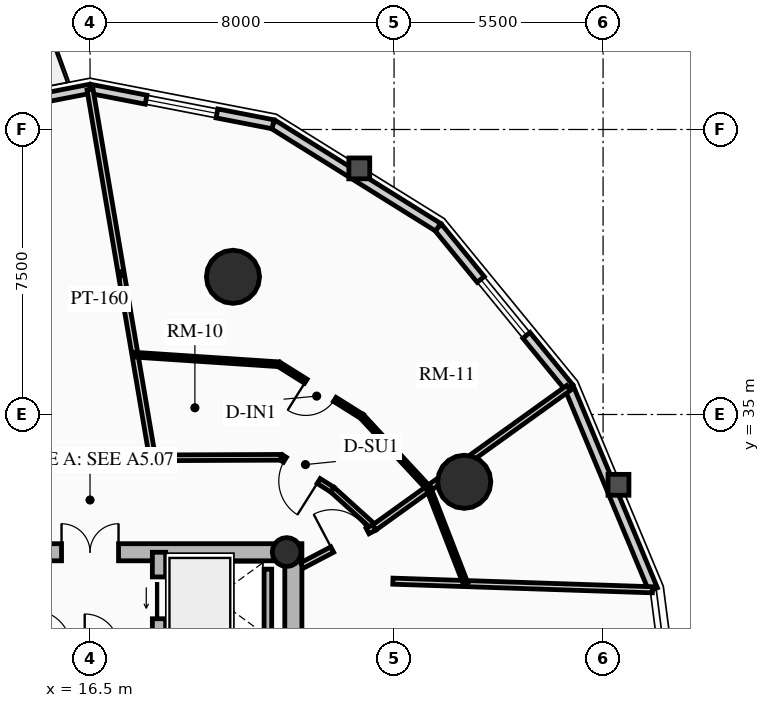
"""IFC4 building model, lengths in metres.
Left out: names, types, materials, properties, quantities, classifications, styles, units other than length and angle.
Written with IfcOpenShell. Run it as: python <this file> out.ifc"""

import sys

from ifc_helpers import new_model, si_unit, direction, frame, frame_2d, origin, origin_2d, place, context, subcontext, project, spatial, rectangle, circle, hollow_circle, extrude, source, transform, mapped, element, fill, save


model = new_model("IFC4")
c1 = context("Model", 3, precision=1e-05, world=origin(), true_north=direction((0.0, 1.0)))
c2 = subcontext(c1, "Body", "Model", "MODEL_VIEW")
j1 = project(units=[si_unit("LENGTHUNIT", "METRE"), si_unit("PLANEANGLEUNIT", "RADIAN")], contexts=[c1])
p1 = place(None, origin())
s1 = spatial("IfcSite", under=j1, at=p1, CompositionType="ELEMENT")
p2 = place(p1, origin())
s2 = spatial("IfcBuilding", under=s1, at=p2, CompositionType="ELEMENT")
p3 = place(p2, frame((0.0, 0.0, 105.07)))
s3 = spatial("IfcBuildingStorey", under=s2, at=p3, CompositionType="ELEMENT", Elevation=105.07)
p4 = place(p3, frame((21.85, 17.4, 0.0), z_axis=(0.0, 0.0, 1.0), x_axis=(0.0, 1.0, 0.0)))
e1 = element("IfcWall", 1, at=p4, inside=s3, PredefinedType="SHEAR", context=c2, shape_type="SweptSolid", body=[
    extrude(rectangle(XDim=14.2, YDim=0.45, at=frame_2d((7.1, 0.0))), origin(), (0.0, 0.0, 1.0), 2.91),
])
p5 = place(p3, frame((11.15, 31.375, 0.0), z_axis=(0.0, 0.0, 1.0), x_axis=(1.0, 0.0, 0.0)))
e2 = element("IfcWall", 2, at=p5, inside=s3, PredefinedType="SHEAR", context=c2, shape_type="SweptSolid", body=[
    extrude(rectangle(XDim=10.7, YDim=0.45, at=frame_2d((5.35, 0.0))), origin(), (0.0, 0.0, 1.0), 2.91),
])
m1 = source(origin(), c2, "Body", "SweptSolid", [
    extrude(rectangle(XDim=1.5, YDim=2.02, at=frame_2d((0.75, 1.01))), frame((0.0, 0.235, 0.0), z_axis=(0.0, -1.0, 0.0), x_axis=(1.0, 0.0, 0.0)), (0.0, 0.0, 1.0), 0.47),
])
p6 = place(p5, frame((4.6, 0.0, 0.0)))
e3 = element("IfcOpeningElement", 3, at=p6, cuts=e2, PredefinedType="OPENING", context=c2, shape_type="MappedRepresentation", body=[
    mapped(m1, transform((0.0, 0.0, 0.0), x_axis=(1.0, 0.0, 0.0), y_axis=(0.0, 1.0, 0.0), z_axis=(0.0, 0.0, 1.0), scale=1.0)),
])
p7 = place(p3, frame((18.315, 17.625, 0.0), z_axis=(0.0, 0.0, 1.0), x_axis=(0.0, 1.0, 0.0)))
e4 = element("IfcWall", 4, at=p7, inside=s3, PredefinedType="SHEAR", context=c2, shape_type="SweptSolid", body=[
    extrude(rectangle(XDim=13.75, YDim=0.35, at=frame_2d((6.875, 0.0))), origin(), (0.0, 0.0, 1.0), 2.91),
])
m2 = source(origin(), c2, "Body", "SweptSolid", [
    extrude(rectangle(XDim=1.1, YDim=2.015, at=frame_2d((0.55, 1.007))), frame((0.0, 0.185, 0.0), z_axis=(0.0, -1.0, 0.0), x_axis=(1.0, 0.0, 0.0)), (0.0, 0.0, 1.0), 0.37),
])
p8 = place(p7, frame((10.0, 0.0, 0.0)))
e5 = element("IfcOpeningElement", 5, at=p8, cuts=e4, PredefinedType="OPENING", context=c2, shape_type="MappedRepresentation", body=[
    mapped(m2, transform((0.0, 0.0, 0.0), x_axis=(1.0, 0.0, 0.0), y_axis=(0.0, 1.0, 0.0), z_axis=(0.0, 0.0, 1.0), scale=1.0)),
])
p9 = place(p7, frame((12.0, 0.0, 0.0)))
e6 = element("IfcOpeningElement", 6, at=p9, cuts=e4, PredefinedType="OPENING", context=c2, shape_type="MappedRepresentation", body=[
    mapped(m2, transform((0.0, 0.0, 0.0), x_axis=(1.0, 0.0, 0.0), y_axis=(0.0, 1.0, 0.0), z_axis=(0.0, 0.0, 1.0), scale=1.0)),
])
m3 = source(origin(), c2, "Body", "SweptSolid", [
    extrude(rectangle(XDim=1.15, YDim=2.02, at=frame_2d((0.575, 1.01))), frame((0.0, 0.185, 0.0), z_axis=(0.0, -1.0, 0.0), x_axis=(1.0, 0.0, 0.0)), (0.0, 0.0, 1.0), 0.37),
])
p10 = place(p7, frame((5.305, 0.0, 0.0)))
e7 = element("IfcOpeningElement", 7, at=p10, cuts=e4, PredefinedType="OPENING", context=c2, shape_type="MappedRepresentation", body=[
    mapped(m3, transform((0.0, 0.0, 0.0), x_axis=(1.0, 0.0, 0.0), y_axis=(0.0, 1.0, 0.0), z_axis=(0.0, 0.0, 1.0), scale=1.0)),
])
p11 = place(p3, frame((21.675, 31.38, 0.0), z_axis=(0.0, 0.0, 1.0), x_axis=(1.0, 0.0, 0.0)))
e8 = element("IfcColumn", 8, at=p11, inside=s3, PredefinedType="COLUMN", context=c2, shape_type="SweptSolid", body=[
    extrude(hollow_circle(Radius=0.38, WallThickness=0.032, at=origin_2d()), origin(), (0.0, 0.0, 1.0), 2.91),
])
for number, where, z_axis, x_axis in (
    (9, (26.347, 33.229, 0.0), (0.0, 0.0, 1.0), (1.0, 0.0, 0.0)),
    (10, (20.261, 38.623, 0.0), (0.0, 0.0, 1.0), (1.0, 0.0, 0.0)),
):
    element("IfcColumn", number, at=place(p3, frame(where, z_axis=z_axis, x_axis=x_axis)), inside=s3, PredefinedType="USERDEFINED", context=c2, shape_type="SweptSolid", body=[
        extrude(circle(Radius=0.7, at=origin_2d()), origin(), (0.0, 0.0, 1.0), 2.91),
    ])
p12 = place(p3, frame((29.105, 35.709, 0.0), z_axis=(0.0, 0.0, 1.0), x_axis=(0.384344417632, -0.923189779317, 0.0)))
e11 = element("IfcWall", 11, at=p12, inside=s3, PredefinedType="SOLIDWALL", context=c2, shape_type="SweptSolid", body=[
    extrude(rectangle(XDim=5.758, YDim=0.24, at=frame_2d((2.879, 0.0))), origin(), (0.0, 0.0, 1.0), 2.179),
])
p13 = place(p3, frame((25.658, 39.928, 0.0), z_axis=(0.0, 0.0, 1.0), x_axis=(0.632700781152, -0.77439635945, 0.0)))
e12 = element("IfcWall", 12, at=p13, inside=s3, PredefinedType="SOLIDWALL", context=c2, shape_type="SweptSolid", body=[
    extrude(rectangle(XDim=5.448, YDim=0.24, at=frame_2d((2.724, 0.0))), origin(), (0.0, 0.0, 1.0), 2.179),
])
m4 = source(origin(), c2, "Body", "SweptSolid", [
    extrude(rectangle(XDim=1.9, YDim=1.35, at=frame_2d((0.95, 0.675))), frame((0.0, 0.13, 0.0), z_axis=(0.0, -1.0, 0.0), x_axis=(1.0, 0.0, 0.0)), (0.0, 0.0, 1.0), 0.26),
])
p14 = place(p13, frame((1.774, 0.0, 0.65)))
e13 = element("IfcOpeningElement", 13, at=p14, cuts=e12, PredefinedType="OPENING", context=c2, shape_type="MappedRepresentation", body=[
    mapped(m4, transform((0.0, 0.0, 0.0), x_axis=(1.0, 0.0, 0.0), y_axis=(0.0, 1.0, 0.0), z_axis=(0.0, 0.0, 1.0), scale=1.0)),
])
p15 = place(p3, frame((21.315, 42.637, 0.0), z_axis=(0.0, 0.0, 1.0), x_axis=(0.848520380187, -0.529162701263, 0.0)))
e14 = element("IfcWall", 14, at=p15, inside=s3, PredefinedType="SOLIDWALL", context=c2, shape_type="SweptSolid", body=[
    extrude(rectangle(XDim=5.119, YDim=0.24, at=frame_2d((2.56, 0.0))), origin(), (0.0, 0.0, 1.0), 2.179),
])
p16 = place(p3, frame((16.5, 43.57, 0.0), z_axis=(0.0, 0.0, 1.0), x_axis=(0.981723785992, -0.190311344954, 0.0)))
e15 = element("IfcWall", 15, at=p16, inside=s3, PredefinedType="SOLIDWALL", context=c2, shape_type="SweptSolid", body=[
    extrude(rectangle(XDim=4.904, YDim=0.24, at=frame_2d((2.452, 0.0))), origin(), (0.0, 0.0, 1.0), 2.179),
])
p17 = place(p16, frame((1.502, 0.0, 0.65)))
e16 = element("IfcOpeningElement", 16, at=p17, cuts=e15, PredefinedType="OPENING", context=c2, shape_type="MappedRepresentation", body=[
    mapped(m4, transform((0.0, 0.0, 0.0), x_axis=(1.0, 0.0, 0.0), y_axis=(0.0, 1.0, 0.0), z_axis=(0.0, 0.0, 1.0), scale=1.0)),
])
p18 = place(p3, frame((11.685, 42.637, 0.0), z_axis=(0.0, 0.0, 1.0), x_axis=(0.981723785992, 0.190311344954, 0.0)))
e17 = element("IfcWall", 17, at=p18, inside=s3, PredefinedType="SOLIDWALL", context=c2, shape_type="SweptSolid", body=[
    extrude(rectangle(XDim=4.904, YDim=0.24, at=frame_2d((2.452, 0.0))), origin(), (0.0, 0.0, 1.0), 2.179),
])
m5 = source(origin(), c2, "Body", "SweptSolid", [
    extrude(rectangle(XDim=1.15, YDim=2.005, at=frame_2d((0.575, 1.002))), frame((0.0, 0.13, 0.0), z_axis=(0.0, -1.0, 0.0), x_axis=(1.0, 0.0, 0.0)), (0.0, 0.0, 1.0), 0.26),
])
p19 = place(p18, frame((1.877, 0.0, 0.0)))
e18 = element("IfcOpeningElement", 18, at=p19, cuts=e17, PredefinedType="OPENING", context=c2, shape_type="MappedRepresentation", body=[
    mapped(m5, transform((0.0, 0.0, 0.0), x_axis=(1.0, 0.0, 0.0), y_axis=(0.0, 1.0, 0.0), z_axis=(0.0, 0.0, 1.0), scale=1.0)),
])
p20 = place(p3, frame((21.18, 29.295, 0.0), z_axis=(0.0, 0.0, 1.0), x_axis=(0.0, 1.0, 0.0)))
e19 = element("IfcWall", 19, at=p20, inside=s3, PredefinedType="SHEAR", context=c2, shape_type="SweptSolid", body=[
    extrude(rectangle(XDim=1.635, YDim=0.2, at=frame_2d((0.817, 0.0))), origin(), (0.0, 0.0, 1.0), 2.91),
])
p21 = place(p3, frame((23.98, 32.027, 0.0), z_axis=(0.0, 0.0, 1.0), x_axis=(-0.742353224332, 0.670008724065, 0.0)))
e20 = element("IfcWall", 20, at=p21, inside=s3, PredefinedType="PARTITIONING", context=c2, shape_type="SweptSolid", body=[
    extrude(rectangle(XDim=1.485, YDim=0.15, at=frame_2d((0.742, 0.0))), origin(), (0.0, 0.0, 1.0), 2.225),
])
p22 = place(p3, frame((22.877, 33.022, 0.0), z_axis=(0.0, 0.0, 1.0), x_axis=(-0.845895608855, 0.533348496689, 0.0)))
e21 = element("IfcWall", 21, at=p22, inside=s3, PredefinedType="PARTITIONING", context=c2, shape_type="SweptSolid", body=[
    extrude(rectangle(XDim=1.597, YDim=0.15, at=frame_2d((0.798, 0.0))), origin(), (0.0, 0.0, 1.0), 2.225),
])
m6 = source(origin(), c2, "Body", "SweptSolid", [
    extrude(rectangle(XDim=1.05, YDim=2.015, at=frame_2d((0.525, 1.007))), frame((0.0, 0.085, 0.0), z_axis=(0.0, -1.0, 0.0), x_axis=(1.0, 0.0, 0.0)), (0.0, 0.0, 1.0), 0.17),
])
p23 = place(p22, frame((0.427, 0.0, 0.0)))
e22 = element("IfcOpeningElement", 22, at=p23, cuts=e21, PredefinedType="OPENING", context=c2, shape_type="MappedRepresentation", body=[
    mapped(m6, transform((0.0, 0.0, 0.0), x_axis=(1.0, 0.0, 0.0), y_axis=(0.0, 1.0, 0.0), z_axis=(0.0, 0.0, 1.0), scale=1.0)),
])
p24 = place(p3, frame((21.527, 33.873, 0.0), z_axis=(0.0, 0.0, 1.0), x_axis=(-0.999991838845, -0.004040079574, 0.0)))
e23 = element("IfcWall", 23, at=p24, inside=s3, PredefinedType="PARTITIONING", context=c2, shape_type="SweptSolid", body=[
    extrude(rectangle(XDim=3.384, YDim=0.15, at=frame_2d((1.692, 0.0))), origin(), (0.0, 0.0, 1.0), 2.225),
])
p25 = place(p3, frame((18.143, 33.86, 0.0), z_axis=(0.0, 0.0, 1.0), x_axis=(-0.999419208319, -0.034077060363, 0.0)))
e24 = element("IfcWall", 24, at=p25, inside=s3, PredefinedType="PARTITIONING", context=c2, shape_type="SweptSolid", body=[
    extrude(rectangle(XDim=6.527, YDim=0.15, at=frame_2d((3.263, 0.0))), origin(), (0.0, 0.0, 1.0), 2.225),
])
p26 = place(p3, frame((24.469, 30.614, 0.0), z_axis=(0.0, 0.0, 1.0), x_axis=(0.999446768925, -0.033258924898, 0.0)))
e25 = element("IfcWall", 25, at=p26, inside=s3, PredefinedType="PARTITIONING", context=c2, shape_type="SweptSolid", body=[
    extrude(rectangle(XDim=6.834, YDim=0.16, at=frame_2d((3.417, 0.0))), origin(), (0.0, 0.0, 1.0), 2.179),
])
p27 = place(p3, frame((23.98, 32.027, 0.0), z_axis=(0.0, 0.0, 1.0), x_axis=(0.812162479031, 0.58343132214, 0.0)))
e26 = element("IfcWall", 26, at=p27, inside=s3, PredefinedType="PARTITIONING", context=c2, shape_type="SweptSolid", body=[
    extrude(rectangle(XDim=6.291, YDim=0.16, at=frame_2d((3.146, 0.0))), origin(), (0.0, 0.0, 1.0), 2.179),
])
p28 = place(p3, frame((18.143, 33.86, 0.0), z_axis=(0.0, 0.0, 1.0), x_axis=(-0.167145472003, 0.985932244725, 0.0)))
e27 = element("IfcWall", 27, at=p28, inside=s3, PredefinedType="PARTITIONING", context=c2, shape_type="SweptSolid", body=[
    extrude(rectangle(XDim=9.829, YDim=0.16, at=frame_2d((4.914, 0.0))), origin(), (0.0, 0.0, 1.0), 2.179),
])
p29 = place(p3, frame((22.075, 31.025, 0.0), z_axis=(0.0, 0.0, 1.0), x_axis=(0.885026466958, 0.465540710125, 0.0)))
e28 = element("IfcWall", 28, at=p29, inside=s3, PredefinedType="PARTITIONING", context=c2, shape_type="SweptSolid", body=[
    extrude(rectangle(XDim=2.152, YDim=0.16, at=frame_2d((1.076, 0.0))), origin(), (0.0, 0.0, 1.0), 2.225),
])
m7 = source(origin(), c2, "Body", "SweptSolid", [
    extrude(rectangle(XDim=1.05, YDim=2.015, at=frame_2d((0.525, 1.007))), frame((0.0, 0.09, 0.0), z_axis=(0.0, -1.0, 0.0), x_axis=(1.0, 0.0, 0.0)), (0.0, 0.0, 1.0), 0.18),
])
p30 = place(p29, frame((0.902, 0.0, 0.0)))
e29 = element("IfcOpeningElement", 29, at=p30, cuts=e28, PredefinedType="OPENING", context=c2, shape_type="MappedRepresentation", body=[
    mapped(m7, transform((0.0, 0.0, 0.0), x_axis=(1.0, 0.0, 0.0), y_axis=(0.0, 1.0, 0.0), z_axis=(0.0, 0.0, 1.0), scale=1.0)),
])
p31 = place(p3, frame((26.382, 30.551, 0.0), z_axis=(0.0, 0.0, 1.0), x_axis=(-0.361621391028, 0.932325034283, 0.0)))
e30 = element("IfcWall", 30, at=p31, inside=s3, PredefinedType="PARTITIONING", context=c2, shape_type="SweptSolid", body=[
    extrude(rectangle(XDim=2.686, YDim=0.125, at=frame_2d((1.343, 0.0))), origin(), (0.0, 0.0, 1.0), 2.225),
])
p32 = place(p3, frame((25.41, 33.054, 0.0), z_axis=(0.0, 0.0, 1.0), x_axis=(-0.679733694606, 0.73345899982, 0.0)))
e31 = element("IfcWall", 31, at=p32, inside=s3, PredefinedType="PARTITIONING", context=c2, shape_type="SweptSolid", body=[
    extrude(rectangle(XDim=2.586, YDim=0.125, at=frame_2d((1.293, 0.0))), origin(), (0.0, 0.0, 1.0), 2.655),
])
p33 = place(p3, frame((23.653, 34.951, 0.0), z_axis=(0.0, 0.0, 1.0), x_axis=(-0.847306782665, 0.531103771452, 0.0)))
e32 = element("IfcWall", 32, at=p33, inside=s3, PredefinedType="PARTITIONING", context=c2, shape_type="SweptSolid", body=[
    extrude(rectangle(XDim=2.581, YDim=0.125, at=frame_2d((1.291, 0.0))), origin(), (0.0, 0.0, 1.0), 2.225),
])
m8 = source(origin(), c2, "Body", "SweptSolid", [
    extrude(rectangle(XDim=0.9, YDim=2.005, at=frame_2d((0.45, 1.002))), frame((0.0, 0.073, 0.0), z_axis=(0.0, -1.0, 0.0), x_axis=(1.0, 0.0, 0.0)), (0.0, 0.0, 1.0), 0.145),
])
p34 = place(p33, frame((0.841, 0.0, 0.0)))
e33 = element("IfcOpeningElement", 33, at=p34, cuts=e32, PredefinedType="OPENING", context=c2, shape_type="MappedRepresentation", body=[
    mapped(m8, transform((0.0, 0.0, 0.0), x_axis=(1.0, 0.0, 0.0), y_axis=(0.0, 1.0, 0.0), z_axis=(0.0, 0.0, 1.0), scale=1.0)),
])
p35 = place(p3, frame((21.466, 36.322, 0.0), z_axis=(0.0, 0.0, 1.0), x_axis=(-0.997806476515, 0.066198454847, 0.0)))
e34 = element("IfcWall", 34, at=p35, inside=s3, PredefinedType="PARTITIONING", context=c2, shape_type="SweptSolid", body=[
    extrude(rectangle(XDim=3.791, YDim=0.125, at=frame_2d((1.896, 0.0))), origin(), (0.0, 0.0, 1.0), 2.225),
])
m9 = source(origin(), c2, "Body", "SweptSolid", [
    extrude(rectangle(XDim=1.9, YDim=1.35, at=frame_2d((0.95, 0.675))), frame((0.0, 0.03, 0.0), z_axis=(0.0, -1.0, 0.0), x_axis=(1.0, 0.0, 0.0)), (0.0, 0.0, 1.0), 0.06),
])
p36 = place(p14, origin())
e35 = element("IfcWindow", 35, at=p36, inside=s3, PartitioningType="DOUBLE_PANEL_VERTICAL", PredefinedType="WINDOW", context=c2, shape_type="MappedRepresentation", body=[
    mapped(m9, transform((0.0, 0.0, 0.0), x_axis=(1.0, 0.0, 0.0), y_axis=(0.0, 1.0, 0.0), z_axis=(0.0, 0.0, 1.0), scale=1.0)),
])
fill(e13, e35)
p37 = place(p17, origin())
e36 = element("IfcWindow", 36, at=p37, inside=s3, PartitioningType="DOUBLE_PANEL_VERTICAL", PredefinedType="WINDOW", context=c2, shape_type="MappedRepresentation", body=[
    mapped(m9, transform((0.0, 0.0, 0.0), x_axis=(1.0, 0.0, 0.0), y_axis=(0.0, 1.0, 0.0), z_axis=(0.0, 0.0, 1.0), scale=1.0)),
])
fill(e16, e36)
m10 = source(origin(), c2, "Body", "SweptSolid", [
    extrude(rectangle(XDim=1.1, YDim=2.015, at=frame_2d((0.55, 1.007))), frame((0.0, 0.025, 0.0), z_axis=(0.0, -1.0, 0.0), x_axis=(1.0, 0.0, 0.0)), (0.0, 0.0, 1.0), 0.05),
])
p38 = place(p9, origin())
e37 = element("IfcDoor", 37, at=p38, inside=s3, OperationType="SLIDING_TO_LEFT", PredefinedType="DOOR", context=c2, shape_type="MappedRepresentation", body=[
    mapped(m10, transform((0.0, 0.0, 0.0), x_axis=(1.0, 0.0, 0.0), y_axis=(0.0, 1.0, 0.0), z_axis=(0.0, 0.0, 1.0), scale=1.0)),
])
fill(e6, e37)
m11 = source(origin(), c2, "Body", "SweptSolid", [
    extrude(rectangle(XDim=1.5, YDim=2.02, at=frame_2d((0.75, 1.01))), frame((0.0, 0.025, 0.0), z_axis=(0.0, -1.0, 0.0), x_axis=(1.0, 0.0, 0.0)), (0.0, 0.0, 1.0), 0.05),
])
p39 = place(p6, origin())
e38 = element("IfcDoor", 38, at=p39, inside=s3, OperationType="DOUBLE_DOOR_SINGLE_SWING", PredefinedType="DOOR", context=c2, shape_type="MappedRepresentation", body=[
    mapped(m11, transform((0.0, 0.0, 0.0), x_axis=(1.0, 0.0, 0.0), y_axis=(0.0, 1.0, 0.0), z_axis=(0.0, 0.0, 1.0), scale=1.0)),
])
fill(e3, e38)
m12 = source(origin(), c2, "Body", "SweptSolid", [
    extrude(rectangle(XDim=1.05, YDim=2.015, at=frame_2d((0.525, 1.007))), frame((0.0, 0.025, 0.0), z_axis=(0.0, -1.0, 0.0), x_axis=(1.0, 0.0, 0.0)), (0.0, 0.0, 1.0), 0.05),
])
p40 = place(p30, origin())
e39 = element("IfcDoor", 39, at=p40, inside=s3, OperationType="SINGLE_SWING_LEFT", PredefinedType="DOOR", context=c2, shape_type="MappedRepresentation", body=[
    mapped(m12, transform((0.0, 0.0, 0.0), x_axis=(1.0, 0.0, 0.0), y_axis=(0.0, 1.0, 0.0), z_axis=(0.0, 0.0, 1.0), scale=1.0)),
])
fill(e29, e39)
p41 = place(p23, origin())
e40 = element("IfcDoor", 40, at=p41, inside=s3, OperationType="SINGLE_SWING_LEFT", PredefinedType="DOOR", context=c2, shape_type="MappedRepresentation", body=[
    mapped(m12, transform((0.0, 0.0, 0.0), x_axis=(1.0, 0.0, 0.0), y_axis=(0.0, 1.0, 0.0), z_axis=(0.0, 0.0, 1.0), scale=1.0)),
])
fill(e22, e40)
m13 = source(origin(), c2, "Body", "SweptSolid", [
    extrude(rectangle(XDim=0.9, YDim=2.005, at=frame_2d((0.45, 1.002))), frame((0.0, 0.025, 0.0), z_axis=(0.0, -1.0, 0.0), x_axis=(1.0, 0.0, 0.0)), (0.0, 0.0, 1.0), 0.05),
])
p42 = place(p34, origin())
e41 = element("IfcDoor", 41, at=p42, inside=s3, OperationType="SINGLE_SWING_RIGHT", PredefinedType="DOOR", context=c2, shape_type="MappedRepresentation", body=[
    mapped(m13, transform((0.0, 0.0, 0.0), x_axis=(1.0, 0.0, 0.0), y_axis=(0.0, 1.0, 0.0), z_axis=(0.0, 0.0, 1.0), scale=1.0)),
])
fill(e33, e41)
save(model, sys.argv[1])
